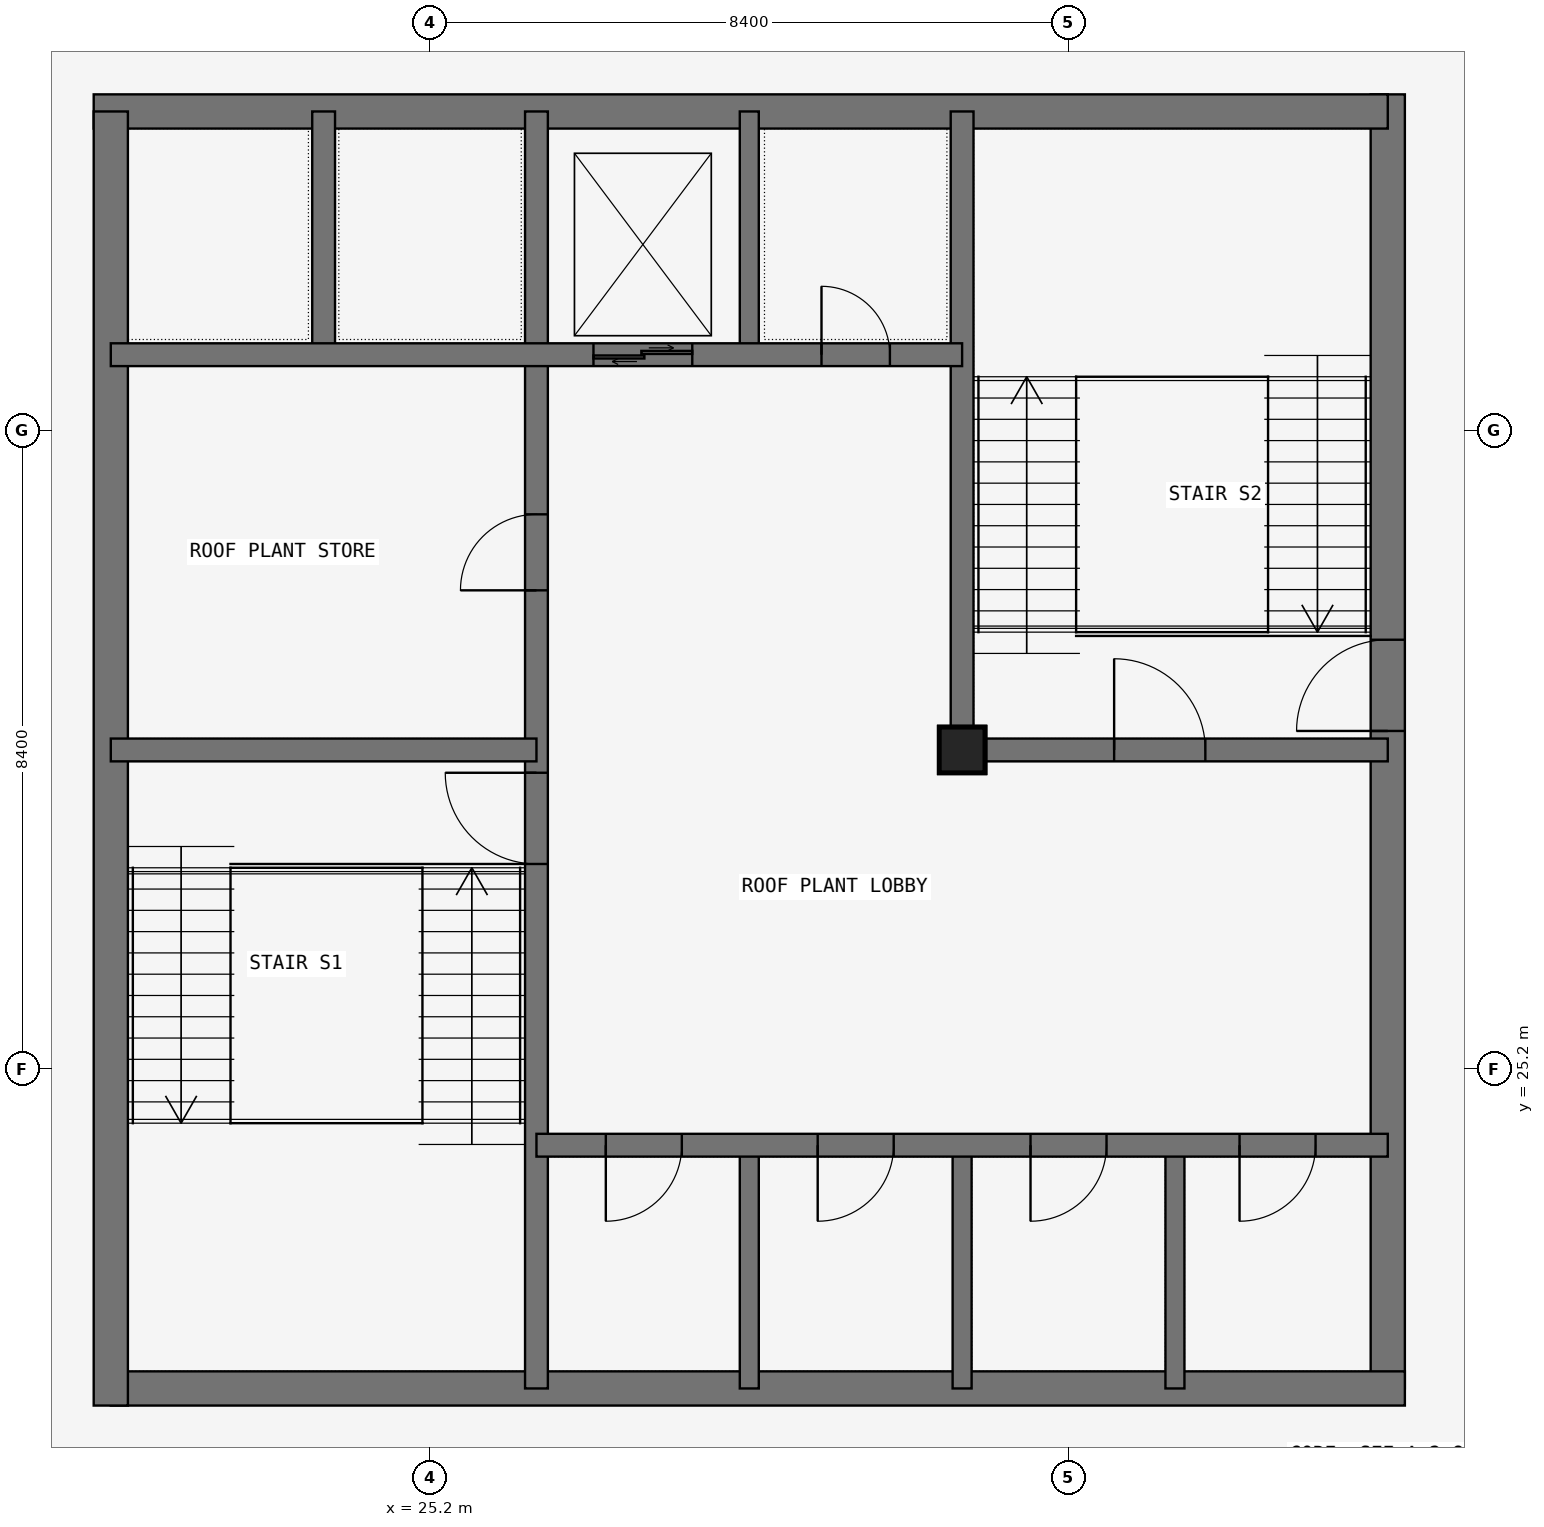
"""IFC4 building model, lengths in metres.
Left out: names, types, materials, properties, quantities, classifications, styles, units other than length and angle.
Written with IfcOpenShell. Run it as: python <this file> out.ifc"""

import sys

from ifc_helpers import new_model, si_unit, direction, frame, frame_2d, origin, origin_2d, place, context, subcontext, project, spatial, rectangle, circle, hollow_circle, extrude, element, fill, save


model = new_model("IFC4")
c1 = context("Model", 3, precision=1e-05, world=origin(), true_north=direction((0.0, 1.0)))
c2 = subcontext(c1, "Body", "Model", "MODEL_VIEW")
j1 = project(units=[si_unit("LENGTHUNIT", "METRE"), si_unit("PLANEANGLEUNIT", "RADIAN")], contexts=[c1])
p1 = place(None, origin())
s1 = spatial("IfcSite", under=j1, at=p1, CompositionType="ELEMENT")
p2 = place(p1, origin())
s2 = spatial("IfcBuilding", under=s1, at=p2, CompositionType="ELEMENT")
p3 = place(p2, frame((0.0, 0.0, 309.9)))
s3 = spatial("IfcBuildingStorey", under=s2, at=p3, CompositionType="ELEMENT", Elevation=309.9)
p4 = place(p3, frame((21.0, 21.0, 0.0), z_axis=(0.0, 0.0, 1.0), x_axis=(1.0, 0.0, 0.0)))
e1 = element("IfcWall", 1, at=p4, inside=s3, PredefinedType="SHEAR", context=c2, shape_type="SweptSolid", body=[
    extrude(rectangle(XDim=17.025, YDim=0.45, at=frame_2d((8.512, 0.0))), origin(), (0.0, 0.0, 1.0), 3.6),
])
p5 = place(p3, frame((37.8, 21.0, 0.0), z_axis=(0.0, 0.0, 1.0), x_axis=(0.0, 1.0, 0.0)))
e2 = element("IfcWall", 2, at=p5, inside=s3, PredefinedType="SHEAR", context=c2, shape_type="SweptSolid", body=[
    extrude(rectangle(XDim=17.025, YDim=0.45, at=frame_2d((8.512, 0.0))), origin(), (0.0, 0.0, 1.0), 3.6),
])
p6 = place(p5, frame((8.65, 0.0, 0.0)))
e3 = element("IfcOpeningElement", 3, at=p6, cuts=e2, PredefinedType="OPENING", context=c2, shape_type="SweptSolid", body=[
    extrude(rectangle(XDim=1.2, YDim=2.1, at=frame_2d((0.6, 1.05))), frame((0.0, 0.235, 0.0), z_axis=(0.0, -1.0, 0.0), x_axis=(1.0, 0.0, 0.0)), (0.0, 0.0, 1.0), 0.47),
])
for number, where, z_axis, x_axis in (
    (4, (37.8, 37.8, 0.0), (0.0, 0.0, 1.0), (-1.0, 0.0, 0.0)),
    (5, (21.0, 37.8, 0.0), (0.0, 0.0, 1.0), (0.0, -1.0, 0.0)),
):
    element("IfcWall", number, at=place(p3, frame(where, z_axis=z_axis, x_axis=x_axis)), inside=s3, PredefinedType="SHEAR", context=c2, shape_type="SweptSolid", body=[
        extrude(rectangle(XDim=17.025, YDim=0.45, at=frame_2d((8.513, 0.0))), origin(), (0.0, 0.0, 1.0), 3.6),
    ])
p7 = place(p3, frame((26.6, 21.0, 0.0), z_axis=(0.0, 0.0, 1.0), x_axis=(0.0, 1.0, 0.0)))
e6 = element("IfcWall", 6, at=p7, inside=s3, PredefinedType="SHEAR", context=c2, shape_type="SweptSolid", body=[
    extrude(rectangle(XDim=16.8, YDim=0.3, at=frame_2d((8.4, 0.0))), origin(), (0.0, 0.0, 1.0), 3.6),
])
p8 = place(p7, frame((6.9, 0.0, 0.0)))
e7 = element("IfcOpeningElement", 7, at=p8, cuts=e6, PredefinedType="OPENING", context=c2, shape_type="SweptSolid", body=[
    extrude(rectangle(XDim=1.2, YDim=2.1, at=frame_2d((0.6, 1.05))), frame((0.0, 0.16, 0.0), z_axis=(0.0, -1.0, 0.0), x_axis=(1.0, 0.0, 0.0)), (0.0, 0.0, 1.0), 0.32),
])
p9 = place(p7, frame((10.5, 0.0, 0.0)))
e8 = element("IfcOpeningElement", 8, at=p9, cuts=e6, PredefinedType="OPENING", context=c2, shape_type="SweptSolid", body=[
    extrude(rectangle(XDim=1.0, YDim=2.1, at=frame_2d((0.5, 1.05))), frame((0.0, 0.16, 0.0), z_axis=(0.0, -1.0, 0.0), x_axis=(1.0, 0.0, 0.0)), (0.0, 0.0, 1.0), 0.32),
])
p10 = place(p3, frame((21.0, 29.4, 0.0), z_axis=(0.0, 0.0, 1.0), x_axis=(1.0, 0.0, 0.0)))
e9 = element("IfcWall", 9, at=p10, inside=s3, PredefinedType="SHEAR", context=c2, shape_type="SweptSolid", body=[
    extrude(rectangle(XDim=5.6, YDim=0.3, at=frame_2d((2.8, 0.0))), origin(), (0.0, 0.0, 1.0), 3.6),
])
p11 = place(p3, frame((21.0, 34.6, 0.0), z_axis=(0.0, 0.0, 1.0), x_axis=(1.0, 0.0, 0.0)))
e10 = element("IfcWall", 10, at=p11, inside=s3, PredefinedType="SHEAR", context=c2, shape_type="SweptSolid", body=[
    extrude(rectangle(XDim=11.2, YDim=0.3, at=frame_2d((5.6, 0.0))), origin(), (0.0, 0.0, 1.0), 3.6),
])
p12 = place(p11, frame((9.35, 0.0, 0.0)))
e11 = element("IfcOpeningElement", 11, at=p12, cuts=e10, PredefinedType="OPENING", context=c2, shape_type="SweptSolid", body=[
    extrude(rectangle(XDim=0.9, YDim=2.1, at=frame_2d((0.45, 1.05))), frame((0.0, 0.16, 0.0), z_axis=(0.0, -1.0, 0.0), x_axis=(1.0, 0.0, 0.0)), (0.0, 0.0, 1.0), 0.32),
])
p13 = place(p11, frame((6.35, 0.0, 0.0)))
e12 = element("IfcOpeningElement", 12, at=p13, cuts=e10, PredefinedType="OPENING", context=c2, shape_type="SweptSolid", body=[
    extrude(rectangle(XDim=1.3, YDim=2.1, at=frame_2d((0.65, 1.05))), frame((0.0, 0.16, 0.0), z_axis=(0.0, -1.0, 0.0), x_axis=(1.0, 0.0, 0.0)), (0.0, 0.0, 1.0), 0.32),
])
p14 = place(p3, frame((23.8, 34.6, 0.0), z_axis=(0.0, 0.0, 1.0), x_axis=(0.0, 1.0, 0.0)))
e13 = element("IfcWall", 13, at=p14, inside=s3, PredefinedType="SHEAR", context=c2, shape_type="SweptSolid", body=[
    extrude(rectangle(XDim=3.2, YDim=0.3, at=frame_2d((1.6, 0.0))), origin(), (0.0, 0.0, 1.0), 3.6),
])
p15 = place(p3, frame((26.6, 24.2, 0.0), z_axis=(0.0, 0.0, 1.0), x_axis=(1.0, 0.0, 0.0)))
e14 = element("IfcWall", 14, at=p15, inside=s3, PredefinedType="SHEAR", context=c2, shape_type="SweptSolid", body=[
    extrude(rectangle(XDim=11.2, YDim=0.3, at=frame_2d((5.6, 0.0))), origin(), (0.0, 0.0, 1.0), 3.6),
])
p16 = place(p15, frame((6.5, 0.0, 0.0)))
e15 = element("IfcOpeningElement", 15, at=p16, cuts=e14, PredefinedType="OPENING", context=c2, shape_type="SweptSolid", body=[
    extrude(rectangle(XDim=1.0, YDim=2.1, at=frame_2d((0.5, 1.05))), frame((0.0, 0.16, 0.0), z_axis=(0.0, -1.0, 0.0), x_axis=(1.0, 0.0, 0.0)), (0.0, 0.0, 1.0), 0.32),
])
p17 = place(p15, frame((9.25, 0.0, 0.0)))
e16 = element("IfcOpeningElement", 16, at=p17, cuts=e14, PredefinedType="OPENING", context=c2, shape_type="SweptSolid", body=[
    extrude(rectangle(XDim=1.0, YDim=2.1, at=frame_2d((0.5, 1.05))), frame((0.0, 0.16, 0.0), z_axis=(0.0, -1.0, 0.0), x_axis=(1.0, 0.0, 0.0)), (0.0, 0.0, 1.0), 0.32),
])
p18 = place(p15, frame((0.913, 0.0, 0.0)))
e17 = element("IfcOpeningElement", 17, at=p18, cuts=e14, PredefinedType="OPENING", context=c2, shape_type="SweptSolid", body=[
    extrude(rectangle(XDim=1.0, YDim=2.1, at=frame_2d((0.5, 1.05))), frame((0.0, 0.16, 0.0), z_axis=(0.0, -1.0, 0.0), x_axis=(1.0, 0.0, 0.0)), (0.0, 0.0, 1.0), 0.32),
])
p19 = place(p15, frame((3.7, 0.0, 0.0)))
e18 = element("IfcOpeningElement", 18, at=p19, cuts=e14, PredefinedType="OPENING", context=c2, shape_type="SweptSolid", body=[
    extrude(rectangle(XDim=1.0, YDim=2.1, at=frame_2d((0.5, 1.05))), frame((0.0, 0.16, 0.0), z_axis=(0.0, -1.0, 0.0), x_axis=(1.0, 0.0, 0.0)), (0.0, 0.0, 1.0), 0.32),
])
p20 = place(p3, frame((32.2, 29.25, 0.0), z_axis=(0.0, 0.0, 1.0), x_axis=(0.0, 1.0, 0.0)))
e19 = element("IfcWall", 19, at=p20, inside=s3, PredefinedType="SHEAR", context=c2, shape_type="SweptSolid", body=[
    extrude(rectangle(XDim=8.55, YDim=0.3, at=frame_2d((4.275, 0.0))), origin(), (0.0, 0.0, 1.0), 3.6),
])
p21 = place(p3, frame((32.2, 29.4, 0.0), z_axis=(0.0, 0.0, 1.0), x_axis=(1.0, 0.0, 0.0)))
e20 = element("IfcWall", 20, at=p21, inside=s3, PredefinedType="SHEAR", context=c2, shape_type="SweptSolid", body=[
    extrude(rectangle(XDim=5.6, YDim=0.3, at=frame_2d((2.8, 0.0))), origin(), (0.0, 0.0, 1.0), 3.6),
])
p22 = place(p21, frame((2.0, 0.0, 0.0)))
e21 = element("IfcOpeningElement", 21, at=p22, cuts=e20, PredefinedType="OPENING", context=c2, shape_type="SweptSolid", body=[
    extrude(rectangle(XDim=1.2, YDim=2.1, at=frame_2d((0.6, 1.05))), frame((0.0, 0.16, 0.0), z_axis=(0.0, -1.0, 0.0), x_axis=(1.0, 0.0, 0.0)), (0.0, 0.0, 1.0), 0.32),
])
for number, where, z_axis, x_axis in (
    (22, (29.4, 21.0, 0.0), (0.0, 0.0, 1.0), (0.0, 1.0, 0.0)),
    (23, (32.2, 21.0, 0.0), (0.0, 0.0, 1.0), (0.0, 1.0, 0.0)),
    (24, (35.0, 21.0, 0.0), (0.0, 0.0, 1.0), (0.0, 1.0, 0.0)),
    (25, (29.4, 34.6, 0.0), (0.0, 0.0, 1.0), (0.0, 1.0, 0.0)),
):
    element("IfcWall", number, at=place(p3, frame(where, z_axis=z_axis, x_axis=x_axis)), inside=s3, PredefinedType="SHEAR", context=c2, shape_type="SweptSolid", body=[
        extrude(rectangle(XDim=3.2, YDim=0.25, at=frame_2d((1.6, 0.0))), origin(), (0.0, 0.0, 1.0), 3.6),
    ])
p23 = place(p3, frame((32.2, 29.4, 0.0), z_axis=(0.0, 0.0, 1.0), x_axis=(1.0, 0.0, 0.0)))
e26 = element("IfcColumn", 26, at=p23, inside=s3, PredefinedType="USERDEFINED", context=c2, shape_type="SweptSolid", body=[
    extrude(hollow_circle(Radius=0.61, WallThickness=0.04, at=origin_2d()), origin(), (0.0, 0.0, 1.0), 18.6),
    extrude(circle(Radius=0.599, at=origin_2d()), frame((0.0, 0.0, 18.55)), (0.0, 0.0, 1.0), 0.05),
])
p24 = place(p3, frame((32.2, 29.4, 18.6), z_axis=(0.0, 0.0, 1.0), x_axis=(1.0, 0.0, 0.0)))
e27 = element("IfcColumn", 27, at=p24, inside=s3, PredefinedType="USERDEFINED", context=c2, shape_type="SweptSolid", body=[
    extrude(hollow_circle(Radius=0.457, WallThickness=0.032, at=origin_2d()), origin(), (0.0, 0.0, 1.0), 15.0),
    extrude(circle(Radius=0.447, at=origin_2d()), frame((0.0, 0.0, 14.95)), (0.0, 0.0, 1.0), 0.05),
])
p25 = place(p3, frame((32.2, 29.4, 33.6), z_axis=(0.0, 0.0, 1.0), x_axis=(1.0, 0.0, 0.0)))
e28 = element("IfcColumn", 28, at=p25, inside=s3, PredefinedType="USERDEFINED", context=c2, shape_type="SweptSolid", body=[
    extrude(hollow_circle(Radius=0.305, WallThickness=0.025, at=origin_2d()), origin(), (0.0, 0.0, 1.0), 14.95),
])
p26 = place(p22, origin())
e29 = element("IfcDoor", 29, at=p26, inside=s3, OperationType="SINGLE_SWING_LEFT", PredefinedType="DOOR", context=c2, shape_type="SweptSolid", body=[
    extrude(rectangle(XDim=1.2, YDim=2.1, at=frame_2d((0.6, 1.05))), frame((0.0, 0.025, 0.0), z_axis=(0.0, -1.0, 0.0), x_axis=(1.0, 0.0, 0.0)), (0.0, 0.0, 1.0), 0.05),
])
fill(e21, e29)
p27 = place(p8, origin())
e30 = element("IfcDoor", 30, at=p27, inside=s3, OperationType="SINGLE_SWING_RIGHT", PredefinedType="DOOR", context=c2, shape_type="SweptSolid", body=[
    extrude(rectangle(XDim=1.2, YDim=2.1, at=frame_2d((0.6, 1.05))), frame((0.0, 0.025, 0.0), z_axis=(0.0, -1.0, 0.0), x_axis=(1.0, 0.0, 0.0)), (0.0, 0.0, 1.0), 0.05),
])
fill(e7, e30)
p28 = place(p9, origin())
e31 = element("IfcDoor", 31, at=p28, inside=s3, OperationType="SINGLE_SWING_LEFT", PredefinedType="DOOR", context=c2, shape_type="SweptSolid", body=[
    extrude(rectangle(XDim=1.0, YDim=2.1, at=frame_2d((0.5, 1.05))), frame((0.0, 0.025, 0.0), z_axis=(0.0, -1.0, 0.0), x_axis=(1.0, 0.0, 0.0)), (0.0, 0.0, 1.0), 0.05),
])
fill(e8, e31)
p29 = place(p16, frame((1.0, 0.0, 0.0), z_axis=(0.0, 0.0, 1.0), x_axis=(-1.0, 0.0, 0.0)))
e32 = element("IfcDoor", 32, at=p29, inside=s3, OperationType="SINGLE_SWING_RIGHT", PredefinedType="DOOR", context=c2, shape_type="SweptSolid", body=[
    extrude(rectangle(XDim=1.0, YDim=2.1, at=frame_2d((0.5, 1.05))), frame((0.0, 0.025, 0.0), z_axis=(0.0, -1.0, 0.0), x_axis=(1.0, 0.0, 0.0)), (0.0, 0.0, 1.0), 0.05),
])
fill(e15, e32)
p30 = place(p17, frame((1.0, 0.0, 0.0), z_axis=(0.0, 0.0, 1.0), x_axis=(-1.0, 0.0, 0.0)))
e33 = element("IfcDoor", 33, at=p30, inside=s3, OperationType="SINGLE_SWING_RIGHT", PredefinedType="DOOR", context=c2, shape_type="SweptSolid", body=[
    extrude(rectangle(XDim=1.0, YDim=2.1, at=frame_2d((0.5, 1.05))), frame((0.0, 0.025, 0.0), z_axis=(0.0, -1.0, 0.0), x_axis=(1.0, 0.0, 0.0)), (0.0, 0.0, 1.0), 0.05),
])
fill(e16, e33)
p31 = place(p18, frame((1.0, 0.0, 0.0), z_axis=(0.0, 0.0, 1.0), x_axis=(-1.0, 0.0, 0.0)))
e34 = element("IfcDoor", 34, at=p31, inside=s3, OperationType="SINGLE_SWING_RIGHT", PredefinedType="DOOR", context=c2, shape_type="SweptSolid", body=[
    extrude(rectangle(XDim=1.0, YDim=2.1, at=frame_2d((0.5, 1.05))), frame((0.0, 0.025, 0.0), z_axis=(0.0, -1.0, 0.0), x_axis=(1.0, 0.0, 0.0)), (0.0, 0.0, 1.0), 0.05),
])
fill(e17, e34)
p32 = place(p19, frame((1.0, 0.0, 0.0), z_axis=(0.0, 0.0, 1.0), x_axis=(-1.0, 0.0, 0.0)))
e35 = element("IfcDoor", 35, at=p32, inside=s3, OperationType="SINGLE_SWING_RIGHT", PredefinedType="DOOR", context=c2, shape_type="SweptSolid", body=[
    extrude(rectangle(XDim=1.0, YDim=2.1, at=frame_2d((0.5, 1.05))), frame((0.0, 0.025, 0.0), z_axis=(0.0, -1.0, 0.0), x_axis=(1.0, 0.0, 0.0)), (0.0, 0.0, 1.0), 0.05),
])
fill(e18, e35)
p33 = place(p12, origin())
e36 = element("IfcDoor", 36, at=p33, inside=s3, OperationType="SINGLE_SWING_LEFT", PredefinedType="DOOR", context=c2, shape_type="SweptSolid", body=[
    extrude(rectangle(XDim=0.9, YDim=2.1, at=frame_2d((0.45, 1.05))), frame((0.0, 0.025, 0.0), z_axis=(0.0, -1.0, 0.0), x_axis=(1.0, 0.0, 0.0)), (0.0, 0.0, 1.0), 0.05),
])
fill(e11, e36)
p34 = place(p6, origin())
e37 = element("IfcDoor", 37, at=p34, inside=s3, OperationType="SINGLE_SWING_LEFT", PredefinedType="DOOR", context=c2, shape_type="SweptSolid", body=[
    extrude(rectangle(XDim=1.2, YDim=2.1, at=frame_2d((0.6, 1.05))), frame((0.0, 0.025, 0.0), z_axis=(0.0, -1.0, 0.0), x_axis=(1.0, 0.0, 0.0)), (0.0, 0.0, 1.0), 0.05),
])
fill(e3, e37)
p35 = place(p13, origin())
e38 = element("IfcDoor", 38, at=p35, inside=s3, OperationType="DOUBLE_DOOR_SLIDING", PredefinedType="DOOR", context=c2, shape_type="SweptSolid", body=[
    extrude(rectangle(XDim=1.3, YDim=2.1, at=frame_2d((0.65, 1.05))), frame((0.0, 0.025, 0.0), z_axis=(0.0, -1.0, 0.0), x_axis=(1.0, 0.0, 0.0)), (0.0, 0.0, 1.0), 0.05),
])
fill(e12, e38)
save(model, sys.argv[1])
